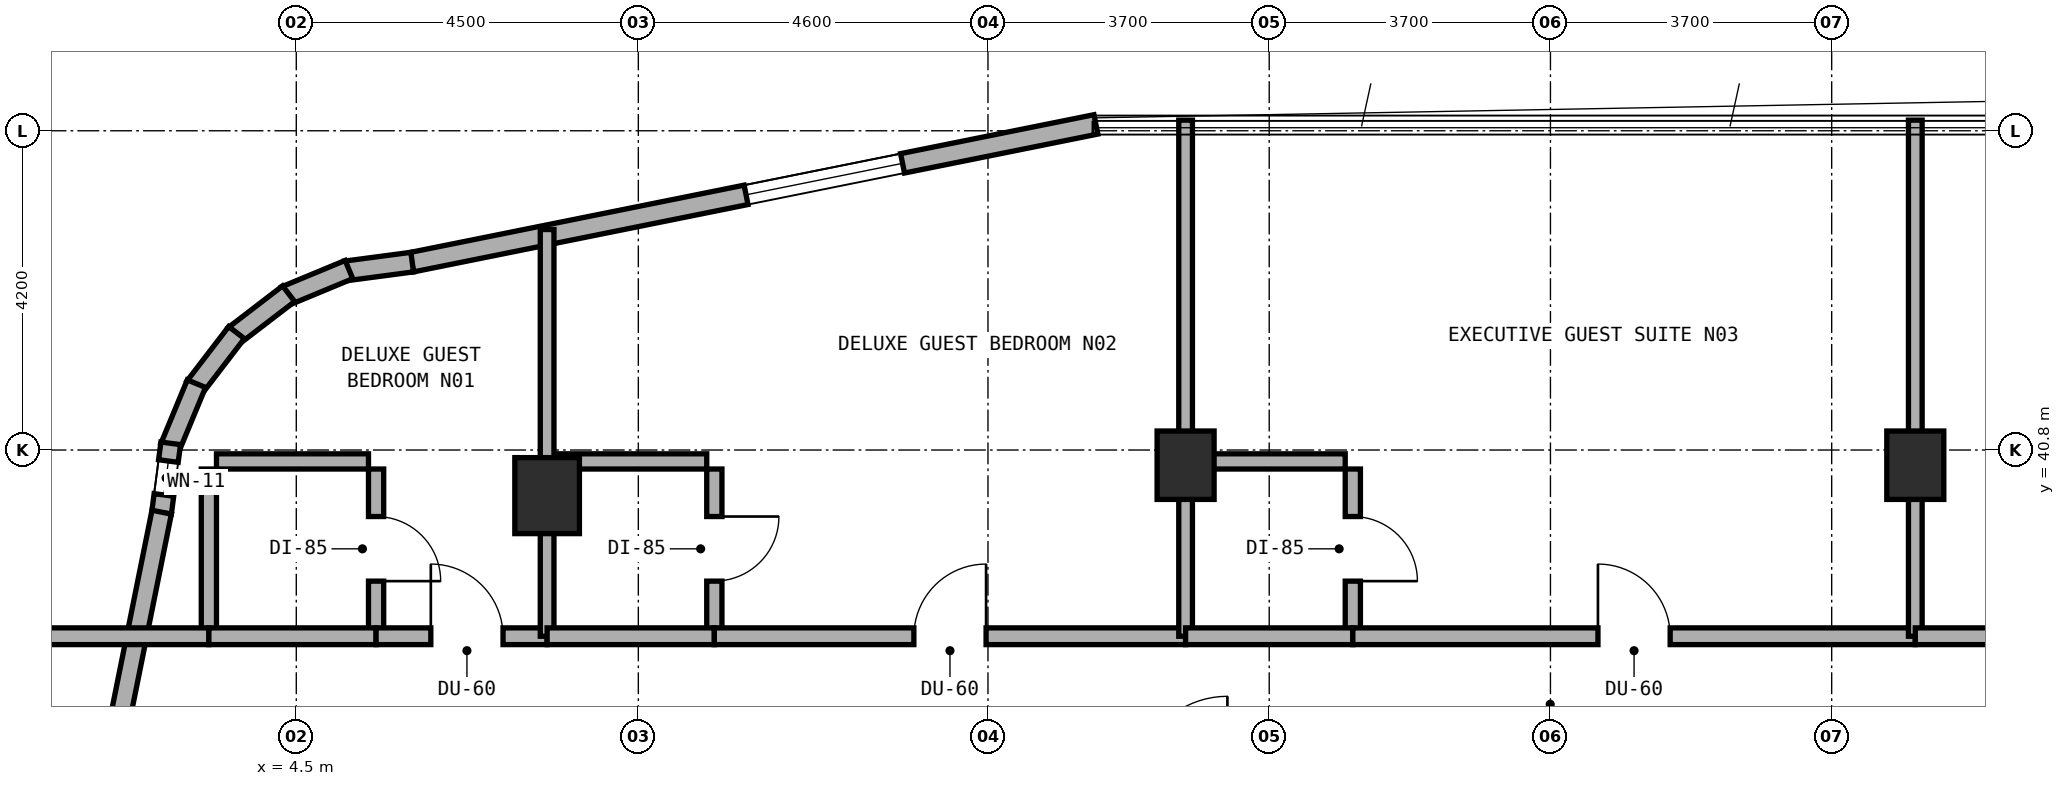
"""IFC4 building model, lengths in metres.
Left out: names, types, materials, properties, quantities, classifications, styles, units other than length and angle.
Written with IfcOpenShell. Run it as: python <this file> out.ifc"""

import sys

from ifc_helpers import new_model, si_unit, direction, frame, frame_2d, origin, origin_2d, place, context, subcontext, project, spatial, rectangle, extrude, element, fill, save


model = new_model("IFC4")
c1 = context("Model", 3, precision=1e-05, world=origin(), true_north=direction((0.0, 1.0)))
c2 = subcontext(c1, "Body", "Model", "MODEL_VIEW")
j1 = project(units=[si_unit("LENGTHUNIT", "METRE"), si_unit("PLANEANGLEUNIT", "RADIAN")], contexts=[c1])
p1 = place(None, origin())
s1 = spatial("IfcSite", under=j1, at=p1, CompositionType="ELEMENT")
p2 = place(p1, origin())
s2 = spatial("IfcBuilding", under=s1, at=p2, CompositionType="ELEMENT")
p3 = place(p2, frame((0.0, 0.0, 159.0)))
s3 = spatial("IfcBuildingStorey", under=s2, at=p3, CompositionType="ELEMENT", Elevation=159.0)
for number, where, z_axis, x_axis in (
    (1, (16.2, 40.6, 0.0), (0.0, 0.0, 1.0), (1.0, 0.0, 0.0)),
    (2, (25.8, 40.6, 0.0), (0.0, 0.0, 1.0), (1.0, 0.0, 0.0)),
):
    element("IfcColumn", number, at=place(p3, frame(where, z_axis=z_axis, x_axis=x_axis)), inside=s3, PredefinedType="COLUMN", context=c2, shape_type="SweptSolid", body=[
        extrude(rectangle(XDim=0.75, YDim=0.9, at=origin_2d()), origin(), (0.0, 0.0, 1.0), 3.5),
    ])
p4 = place(p3, frame((7.8, 40.2, 0.0), z_axis=(0.0, 0.0, 1.0), x_axis=(1.0, 0.0, 0.0)))
e3 = element("IfcColumn", 3, at=p4, inside=s3, PredefinedType="COLUMN", context=c2, shape_type="SweptSolid", body=[
    extrude(rectangle(XDim=0.85, YDim=1.0, at=origin_2d()), origin(), (0.0, 0.0, 1.0), 3.5),
])
p5 = place(p3, frame((15.02, 45.084, 0.0), z_axis=(0.0, 0.0, 1.0), x_axis=(-0.980315963543, -0.197435082048, 0.0)))
e4 = element("IfcWall", 4, at=p5, inside=s3, PredefinedType="STANDARD", context=c2, shape_type="SweptSolid", body=[
    extrude(rectangle(XDim=9.183, YDim=0.26, at=frame_2d((4.591, 0.0))), origin(), (0.0, 0.0, 1.0), 3.22),
])
p6 = place(p5, frame((2.595, 0.0, 0.85)))
e5 = element("IfcOpeningElement", 5, at=p6, cuts=e4, PredefinedType="OPENING", context=c2, shape_type="SweptSolid", body=[
    extrude(rectangle(XDim=2.1, YDim=1.5, at=frame_2d((1.05, 0.75))), frame((0.0, 0.14, 0.0), z_axis=(0.0, -1.0, 0.0), x_axis=(1.0, 0.0, 0.0)), (0.0, 0.0, 1.0), 0.28),
])
p7 = place(p3, frame((6.025, 43.272, 0.0), z_axis=(0.0, 0.0, 1.0), x_axis=(-0.991388484223, -0.130953706898, 0.0)))
e6 = element("IfcWall", 6, at=p7, inside=s3, PredefinedType="STANDARD", context=c2, shape_type="SweptSolid", body=[
    extrude(rectangle(XDim=0.885, YDim=0.26, at=frame_2d((0.443, 0.0))), origin(), (0.0, 0.0, 1.0), 3.22),
])
p8 = place(p3, frame((5.193, 43.174, 0.0), z_axis=(0.0, 0.0, 1.0), x_axis=(-0.923627776508, -0.383290660547, 0.0)))
e7 = element("IfcWall", 7, at=p8, inside=s3, PredefinedType="STANDARD", context=c2, shape_type="SweptSolid", body=[
    extrude(rectangle(XDim=0.903, YDim=0.26, at=frame_2d((0.452, 0.0))), origin(), (0.0, 0.0, 1.0), 3.22),
])
p9 = place(p3, frame((4.399, 42.856, 0.0), z_axis=(0.0, 0.0, 1.0), x_axis=(-0.793458244748, -0.608624690463, 0.0)))
e8 = element("IfcWall", 8, at=p9, inside=s3, PredefinedType="STANDARD", context=c2, shape_type="SweptSolid", body=[
    extrude(rectangle(XDim=0.902, YDim=0.26, at=frame_2d((0.451, 0.0))), origin(), (0.0, 0.0, 1.0), 3.22),
])
p10 = place(p3, frame((3.714, 42.345, 0.0), z_axis=(0.0, 0.0, 1.0), x_axis=(-0.608494022858, -0.793558456666, 0.0)))
e9 = element("IfcWall", 9, at=p10, inside=s3, PredefinedType="STANDARD", context=c2, shape_type="SweptSolid", body=[
    extrude(rectangle(XDim=0.902, YDim=0.26, at=frame_2d((0.451, 0.0))), origin(), (0.0, 0.0, 1.0), 3.22),
])
p11 = place(p3, frame((3.186, 41.673, 0.0), z_axis=(0.0, 0.0, 1.0), x_axis=(-0.383155708213, -0.923683767999, 0.0)))
e10 = element("IfcWall", 10, at=p11, inside=s3, PredefinedType="STANDARD", context=c2, shape_type="SweptSolid", body=[
    extrude(rectangle(XDim=0.903, YDim=0.26, at=frame_2d((0.451, 0.0))), origin(), (0.0, 0.0, 1.0), 3.22),
])
p12 = place(p3, frame((2.848, 40.888, 0.0), z_axis=(0.0, 0.0, 1.0), x_axis=(-0.130200706103, -0.991487658083, 0.0)))
e11 = element("IfcWall", 11, at=p12, inside=s3, PredefinedType="STANDARD", context=c2, shape_type="SweptSolid", body=[
    extrude(rectangle(XDim=0.921, YDim=0.26, at=frame_2d((0.46, 0.0))), origin(), (0.0, 0.0, 1.0), 3.22),
])
p13 = place(p12, frame((0.235, 0.0, 0.85)))
e12 = element("IfcOpeningElement", 12, at=p13, cuts=e11, PredefinedType="OPENING", context=c2, shape_type="SweptSolid", body=[
    extrude(rectangle(XDim=0.45, YDim=1.5, at=frame_2d((0.225, 0.75))), frame((0.0, 0.14, 0.0), z_axis=(0.0, -1.0, 0.0), x_axis=(1.0, 0.0, 0.0)), (0.0, 0.0, 1.0), 0.28),
])
p14 = place(p3, frame((2.729, 39.982, 0.0), z_axis=(0.0, 0.0, 1.0), x_axis=(-0.197435082048, -0.980315963543, 0.0)))
e13 = element("IfcWall", 13, at=p14, inside=s3, PredefinedType="STANDARD", context=c2, shape_type="SweptSolid", body=[
    extrude(rectangle(XDim=9.183, YDim=0.26, at=frame_2d((4.591, 0.0))), origin(), (0.0, 0.0, 1.0), 3.22),
])
p15 = place(p14, frame((4.436, 0.0, 0.85)))
e14 = element("IfcOpeningElement", 14, at=p15, cuts=e13, PredefinedType="OPENING", context=c2, shape_type="SweptSolid", body=[
    extrude(rectangle(XDim=2.1, YDim=1.5, at=frame_2d((1.05, 0.75))), frame((0.0, 0.14, 0.0), z_axis=(0.0, -1.0, 0.0), x_axis=(1.0, 0.0, 0.0)), (0.0, 0.0, 1.0), 0.28),
])
p16 = place(p3, frame((5.55, 38.45, 0.0), z_axis=(0.0, 0.0, 1.0), x_axis=(0.0, 1.0, 0.0)))
e15 = element("IfcWall", 15, at=p16, inside=s3, PredefinedType="PLUMBINGWALL", context=c2, shape_type="SweptSolid", body=[
    extrude(rectangle(XDim=2.1, YDim=0.2, at=frame_2d((1.05, 0.0))), origin(), (0.0, 0.0, 1.0), 3.22),
])
p17 = place(p16, frame((0.625, 0.0, 0.0)))
e16 = element("IfcOpeningElement", 16, at=p17, cuts=e15, PredefinedType="OPENING", context=c2, shape_type="SweptSolid", body=[
    extrude(rectangle(XDim=0.85, YDim=2.1, at=frame_2d((0.425, 1.05))), frame((0.0, 0.11, 0.0), z_axis=(0.0, -1.0, 0.0), x_axis=(1.0, 0.0, 0.0)), (0.0, 0.0, 1.0), 0.22),
])
p18 = place(p3, frame((3.45, 40.65, 0.0), z_axis=(0.0, 0.0, 1.0), x_axis=(1.0, 0.0, 0.0)))
e17 = element("IfcWall", 17, at=p18, inside=s3, PredefinedType="PLUMBINGWALL", context=c2, shape_type="SweptSolid", body=[
    extrude(rectangle(XDim=2.0, YDim=0.2, at=frame_2d((1.0, 0.0))), origin(), (0.0, 0.0, 1.0), 3.22),
])
p19 = place(p3, frame((3.35, 38.45, 0.0), z_axis=(0.0, 0.0, 1.0), x_axis=(0.0, 1.0, 0.0)))
e18 = element("IfcWall", 18, at=p19, inside=s3, PredefinedType="PLUMBINGWALL", context=c2, shape_type="SweptSolid", body=[
    extrude(rectangle(XDim=2.1, YDim=0.2, at=frame_2d((1.05, 0.0))), origin(), (0.0, 0.0, 1.0), 3.22),
])
p20 = place(p3, frame((0.96, 38.35, 0.0), z_axis=(0.0, 0.0, 1.0), x_axis=(1.0, 0.0, 0.0)))
e19 = element("IfcWall", 19, at=p20, inside=s3, PredefinedType="SOLIDWALL", context=c2, shape_type="SweptSolid", body=[
    extrude(rectangle(XDim=2.39, YDim=0.22, at=frame_2d((1.195, 0.0))), origin(), (0.0, 0.0, 1.0), 3.22),
])
p21 = place(p3, frame((3.35, 38.35, 0.0), z_axis=(0.0, 0.0, 1.0), x_axis=(1.0, 0.0, 0.0)))
e20 = element("IfcWall", 20, at=p21, inside=s3, PredefinedType="SOLIDWALL", context=c2, shape_type="SweptSolid", body=[
    extrude(rectangle(XDim=2.2, YDim=0.22, at=frame_2d((1.1, 0.0))), origin(), (0.0, 0.0, 1.0), 3.22),
])
p22 = place(p3, frame((5.55, 38.35, 0.0), z_axis=(0.0, 0.0, 1.0), x_axis=(1.0, 0.0, 0.0)))
e21 = element("IfcWall", 21, at=p22, inside=s3, PredefinedType="SOLIDWALL", context=c2, shape_type="SweptSolid", body=[
    extrude(rectangle(XDim=2.25, YDim=0.22, at=frame_2d((1.125, 0.0))), origin(), (0.0, 0.0, 1.0), 2.795),
])
p23 = place(p22, frame((0.72, 0.0, 0.0)))
e22 = element("IfcOpeningElement", 22, at=p23, cuts=e21, PredefinedType="OPENING", context=c2, shape_type="SweptSolid", body=[
    extrude(rectangle(XDim=0.95, YDim=2.1, at=frame_2d((0.475, 1.05))), frame((0.0, 0.12, 0.0), z_axis=(0.0, -1.0, 0.0), x_axis=(1.0, 0.0, 0.0)), (0.0, 0.0, 1.0), 0.24),
])
p24 = place(p3, frame((7.8, 38.35, 0.0), z_axis=(0.0, 0.0, 1.0), x_axis=(0.0, 1.0, 0.0)))
e23 = element("IfcWall", 23, at=p24, inside=s3, PredefinedType="SOLIDWALL", context=c2, shape_type="SweptSolid", body=[
    extrude(rectangle(XDim=5.351, YDim=0.18, at=frame_2d((2.675, 0.0))), origin(), (0.0, 0.0, 1.0), 2.795),
])
p25 = place(p3, frame((10.0, 38.45, 0.0), z_axis=(0.0, 0.0, 1.0), x_axis=(0.0, 1.0, 0.0)))
e24 = element("IfcWall", 24, at=p25, inside=s3, PredefinedType="PLUMBINGWALL", context=c2, shape_type="SweptSolid", body=[
    extrude(rectangle(XDim=2.1, YDim=0.2, at=frame_2d((1.05, 0.0))), origin(), (0.0, 0.0, 1.0), 2.835),
])
p26 = place(p25, frame((0.625, 0.0, 0.0)))
e25 = element("IfcOpeningElement", 25, at=p26, cuts=e24, PredefinedType="OPENING", context=c2, shape_type="SweptSolid", body=[
    extrude(rectangle(XDim=0.85, YDim=2.1, at=frame_2d((0.425, 1.05))), frame((0.0, 0.11, 0.0), z_axis=(0.0, -1.0, 0.0), x_axis=(1.0, 0.0, 0.0)), (0.0, 0.0, 1.0), 0.22),
])
p27 = place(p3, frame((7.9, 40.65, 0.0), z_axis=(0.0, 0.0, 1.0), x_axis=(1.0, 0.0, 0.0)))
e26 = element("IfcWall", 26, at=p27, inside=s3, PredefinedType="PLUMBINGWALL", context=c2, shape_type="SweptSolid", body=[
    extrude(rectangle(XDim=2.0, YDim=0.2, at=frame_2d((1.0, 0.0))), origin(), (0.0, 0.0, 1.0), 3.22),
])
p28 = place(p3, frame((7.8, 38.35, 0.0), z_axis=(0.0, 0.0, 1.0), x_axis=(1.0, 0.0, 0.0)))
e27 = element("IfcWall", 27, at=p28, inside=s3, PredefinedType="SOLIDWALL", context=c2, shape_type="SweptSolid", body=[
    extrude(rectangle(XDim=2.2, YDim=0.22, at=frame_2d((1.1, 0.0))), origin(), (0.0, 0.0, 1.0), 2.795),
])
p29 = place(p3, frame((10.0, 38.35, 0.0), z_axis=(0.0, 0.0, 1.0), x_axis=(1.0, 0.0, 0.0)))
e28 = element("IfcWall", 28, at=p29, inside=s3, PredefinedType="SOLIDWALL", context=c2, shape_type="SweptSolid", body=[
    extrude(rectangle(XDim=6.2, YDim=0.22, at=frame_2d((3.1, 0.0))), origin(), (0.0, 0.0, 1.0), 2.795),
])
p30 = place(p29, frame((2.625, 0.0, 0.0)))
e29 = element("IfcOpeningElement", 29, at=p30, cuts=e28, PredefinedType="OPENING", context=c2, shape_type="SweptSolid", body=[
    extrude(rectangle(XDim=0.95, YDim=2.1, at=frame_2d((0.475, 1.05))), frame((0.0, 0.12, 0.0), z_axis=(0.0, -1.0, 0.0), x_axis=(1.0, 0.0, 0.0)), (0.0, 0.0, 1.0), 0.24),
])
p31 = place(p3, frame((16.2, 38.35, 0.0), z_axis=(0.0, 0.0, 1.0), x_axis=(0.0, 1.0, 0.0)))
e30 = element("IfcWall", 30, at=p31, inside=s3, PredefinedType="SOLIDWALL", context=c2, shape_type="SweptSolid", body=[
    extrude(rectangle(XDim=6.79, YDim=0.18, at=frame_2d((3.395, 0.0))), origin(), (0.0, 0.0, 1.0), 2.795),
])
p32 = place(p3, frame((18.4, 38.45, 0.0), z_axis=(0.0, 0.0, 1.0), x_axis=(0.0, 1.0, 0.0)))
e31 = element("IfcWall", 31, at=p32, inside=s3, PredefinedType="PLUMBINGWALL", context=c2, shape_type="SweptSolid", body=[
    extrude(rectangle(XDim=2.1, YDim=0.2, at=frame_2d((1.05, 0.0))), origin(), (0.0, 0.0, 1.0), 2.835),
])
p33 = place(p32, frame((0.625, 0.0, 0.0)))
e32 = element("IfcOpeningElement", 32, at=p33, cuts=e31, PredefinedType="OPENING", context=c2, shape_type="SweptSolid", body=[
    extrude(rectangle(XDim=0.85, YDim=2.1, at=frame_2d((0.425, 1.05))), frame((0.0, 0.11, 0.0), z_axis=(0.0, -1.0, 0.0), x_axis=(1.0, 0.0, 0.0)), (0.0, 0.0, 1.0), 0.22),
])
p34 = place(p3, frame((16.3, 40.65, 0.0), z_axis=(0.0, 0.0, 1.0), x_axis=(1.0, 0.0, 0.0)))
e33 = element("IfcWall", 33, at=p34, inside=s3, PredefinedType="PLUMBINGWALL", context=c2, shape_type="SweptSolid", body=[
    extrude(rectangle(XDim=2.0, YDim=0.2, at=frame_2d((1.0, 0.0))), origin(), (0.0, 0.0, 1.0), 2.835),
])
p35 = place(p3, frame((16.2, 38.35, 0.0), z_axis=(0.0, 0.0, 1.0), x_axis=(1.0, 0.0, 0.0)))
e34 = element("IfcWall", 34, at=p35, inside=s3, PredefinedType="SOLIDWALL", context=c2, shape_type="SweptSolid", body=[
    extrude(rectangle(XDim=2.2, YDim=0.22, at=frame_2d((1.1, 0.0))), origin(), (0.0, 0.0, 1.0), 2.795),
])
p36 = place(p3, frame((18.4, 38.35, 0.0), z_axis=(0.0, 0.0, 1.0), x_axis=(1.0, 0.0, 0.0)))
e35 = element("IfcWall", 35, at=p36, inside=s3, PredefinedType="SOLIDWALL", context=c2, shape_type="SweptSolid", body=[
    extrude(rectangle(XDim=7.4, YDim=0.22, at=frame_2d((3.7, 0.0))), origin(), (0.0, 0.0, 1.0), 2.795),
])
p37 = place(p36, frame((3.225, 0.0, 0.0)))
e36 = element("IfcOpeningElement", 36, at=p37, cuts=e35, PredefinedType="OPENING", context=c2, shape_type="SweptSolid", body=[
    extrude(rectangle(XDim=0.95, YDim=2.1, at=frame_2d((0.475, 1.05))), frame((0.0, 0.12, 0.0), z_axis=(0.0, -1.0, 0.0), x_axis=(1.0, 0.0, 0.0)), (0.0, 0.0, 1.0), 0.24),
])
p38 = place(p3, frame((25.8, 38.35, 0.0), z_axis=(0.0, 0.0, 1.0), x_axis=(0.0, 1.0, 0.0)))
e37 = element("IfcWall", 37, at=p38, inside=s3, PredefinedType="SOLIDWALL", context=c2, shape_type="SweptSolid", body=[
    extrude(rectangle(XDim=6.79, YDim=0.18, at=frame_2d((3.395, 0.0))), origin(), (0.0, 0.0, 1.0), 2.795),
])
p39 = place(p3, frame((25.8, 38.35, 0.0), z_axis=(0.0, 0.0, 1.0), x_axis=(1.0, 0.0, 0.0)))
e38 = element("IfcWall", 38, at=p39, inside=s3, PredefinedType="SOLIDWALL", context=c2, shape_type="SweptSolid", body=[
    extrude(rectangle(XDim=10.65, YDim=0.22, at=frame_2d((5.325, 0.0))), origin(), (0.0, 0.0, 1.0), 2.795),
])
p40 = place(p39, frame((4.85, 0.0, 0.0)))
e39 = element("IfcOpeningElement", 39, at=p40, cuts=e38, PredefinedType="OPENING", context=c2, shape_type="SweptSolid", body=[
    extrude(rectangle(XDim=0.95, YDim=2.1, at=frame_2d((0.475, 1.05))), frame((0.0, 0.12, 0.0), z_axis=(0.0, -1.0, 0.0), x_axis=(1.0, 0.0, 0.0)), (0.0, 0.0, 1.0), 0.24),
])
p41 = place(p6, origin())
e40 = element("IfcWindow", 40, at=p41, inside=s3, PartitioningType="SINGLE_PANEL", PredefinedType="WINDOW", context=c2, shape_type="SweptSolid", body=[
    extrude(rectangle(XDim=2.1, YDim=1.5, at=frame_2d((1.05, 0.75))), frame((0.0, 0.03, 0.0), z_axis=(0.0, -1.0, 0.0), x_axis=(1.0, 0.0, 0.0)), (0.0, 0.0, 1.0), 0.06),
])
fill(e5, e40)
p42 = place(p13, origin())
e41 = element("IfcWindow", 41, at=p42, inside=s3, PartitioningType="SINGLE_PANEL", PredefinedType="WINDOW", context=c2, shape_type="SweptSolid", body=[
    extrude(rectangle(XDim=0.45, YDim=1.5, at=frame_2d((0.225, 0.75))), frame((0.0, 0.03, 0.0), z_axis=(0.0, -1.0, 0.0), x_axis=(1.0, 0.0, 0.0)), (0.0, 0.0, 1.0), 0.06),
])
fill(e12, e41)
p43 = place(p17, frame((0.85, 0.0, 0.0), z_axis=(0.0, 0.0, 1.0), x_axis=(-1.0, 0.0, 0.0)))
e42 = element("IfcDoor", 42, at=p43, inside=s3, OperationType="SINGLE_SWING_RIGHT", PredefinedType="DOOR", context=c2, shape_type="SweptSolid", body=[
    extrude(rectangle(XDim=0.85, YDim=2.1, at=frame_2d((0.425, 1.05))), frame((0.0, 0.025, 0.0), z_axis=(0.0, -1.0, 0.0), x_axis=(1.0, 0.0, 0.0)), (0.0, 0.0, 1.0), 0.05),
])
fill(e16, e42)
p44 = place(p23, origin())
e43 = element("IfcDoor", 43, at=p44, inside=s3, OperationType="SINGLE_SWING_LEFT", PredefinedType="DOOR", context=c2, shape_type="SweptSolid", body=[
    extrude(rectangle(XDim=0.95, YDim=2.1, at=frame_2d((0.475, 1.05))), frame((0.0, 0.025, 0.0), z_axis=(0.0, -1.0, 0.0), x_axis=(1.0, 0.0, 0.0)), (0.0, 0.0, 1.0), 0.05),
])
fill(e22, e43)
p45 = place(p26, frame((0.85, 0.0, 0.0), z_axis=(0.0, 0.0, 1.0), x_axis=(-1.0, 0.0, 0.0)))
e44 = element("IfcDoor", 44, at=p45, inside=s3, OperationType="SINGLE_SWING_LEFT", PredefinedType="DOOR", context=c2, shape_type="SweptSolid", body=[
    extrude(rectangle(XDim=0.85, YDim=2.1, at=frame_2d((0.425, 1.05))), frame((0.0, 0.025, 0.0), z_axis=(0.0, -1.0, 0.0), x_axis=(1.0, 0.0, 0.0)), (0.0, 0.0, 1.0), 0.05),
])
fill(e25, e44)
p46 = place(p30, origin())
e45 = element("IfcDoor", 45, at=p46, inside=s3, OperationType="SINGLE_SWING_RIGHT", PredefinedType="DOOR", context=c2, shape_type="SweptSolid", body=[
    extrude(rectangle(XDim=0.95, YDim=2.1, at=frame_2d((0.475, 1.05))), frame((0.0, 0.025, 0.0), z_axis=(0.0, -1.0, 0.0), x_axis=(1.0, 0.0, 0.0)), (0.0, 0.0, 1.0), 0.05),
])
fill(e29, e45)
p47 = place(p33, frame((0.85, 0.0, 0.0), z_axis=(0.0, 0.0, 1.0), x_axis=(-1.0, 0.0, 0.0)))
e46 = element("IfcDoor", 46, at=p47, inside=s3, OperationType="SINGLE_SWING_RIGHT", PredefinedType="DOOR", context=c2, shape_type="SweptSolid", body=[
    extrude(rectangle(XDim=0.85, YDim=2.1, at=frame_2d((0.425, 1.05))), frame((0.0, 0.025, 0.0), z_axis=(0.0, -1.0, 0.0), x_axis=(1.0, 0.0, 0.0)), (0.0, 0.0, 1.0), 0.05),
])
fill(e32, e46)
p48 = place(p37, origin())
e47 = element("IfcDoor", 47, at=p48, inside=s3, OperationType="SINGLE_SWING_LEFT", PredefinedType="DOOR", context=c2, shape_type="SweptSolid", body=[
    extrude(rectangle(XDim=0.95, YDim=2.1, at=frame_2d((0.475, 1.05))), frame((0.0, 0.025, 0.0), z_axis=(0.0, -1.0, 0.0), x_axis=(1.0, 0.0, 0.0)), (0.0, 0.0, 1.0), 0.05),
])
fill(e36, e47)
save(model, sys.argv[1])
